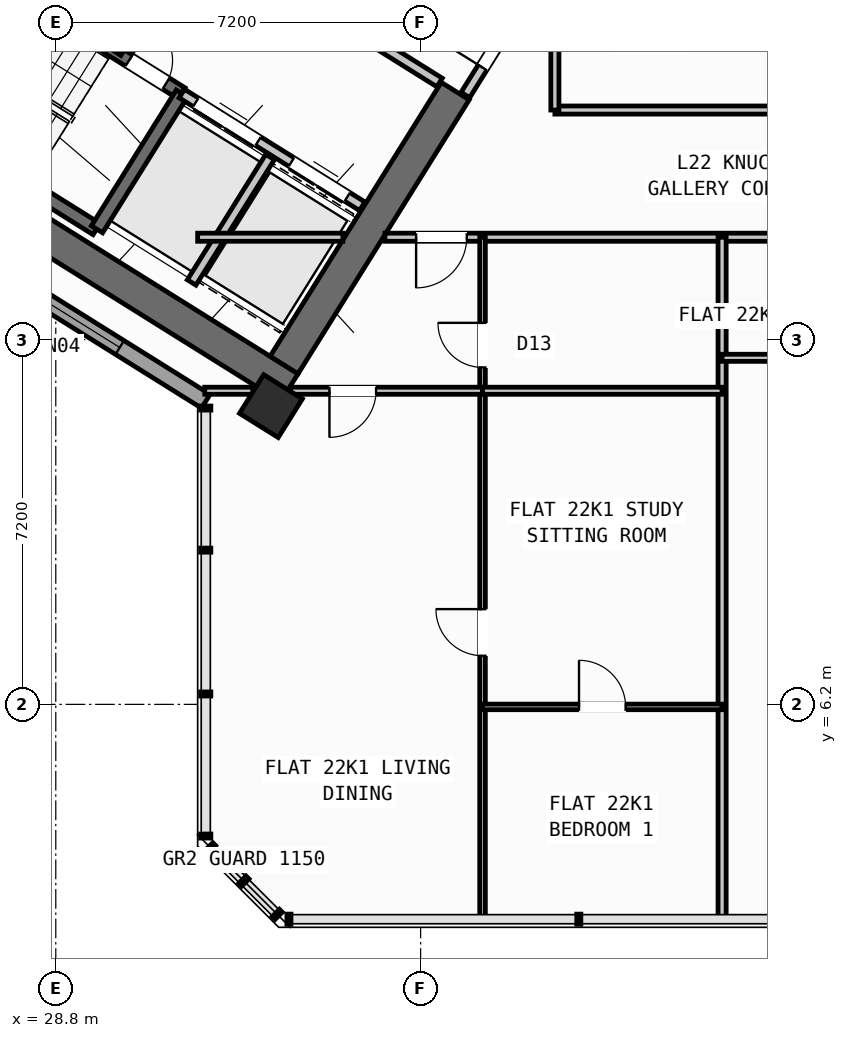
"""IFC4 building model, lengths in metres.
Left out: names, types, materials, properties, quantities, classifications, styles, units other than length and angle.
Written with IfcOpenShell. Run it as: python <this file> out.ifc"""

import sys

from ifc_helpers import new_model, si_unit, direction, frame, frame_2d, origin, origin_2d, place, context, subcontext, project, spatial, rectangle, hollow_rectangle, extrude, source, transform, mapped, element, fill, save


model = new_model("IFC4")
c1 = context("Model", 3, precision=1e-05, world=origin(), true_north=direction((0.0, 1.0)))
c2 = subcontext(c1, "Body", "Model", "MODEL_VIEW")
j1 = project(units=[si_unit("LENGTHUNIT", "METRE"), si_unit("PLANEANGLEUNIT", "RADIAN")], contexts=[c1])
p1 = place(None, origin())
s1 = spatial("IfcSite", under=j1, at=p1, CompositionType="ELEMENT")
p2 = place(p1, origin())
s2 = spatial("IfcBuilding", under=s1, at=p2, CompositionType="ELEMENT")
p3 = place(p2, frame((0.0, 0.0, 90.0)))
s3 = spatial("IfcBuildingStorey", under=s2, at=p3, CompositionType="ELEMENT", Elevation=90.0)
p4 = place(p3, frame((33.409, 12.45, 0.0), z_axis=(0.0, 0.0, 1.0), x_axis=(-0.848051132073, 0.529914405721, 0.0)))
e1 = element("IfcWall", 1, at=p4, inside=s3, PredefinedType="SHEAR", context=c2, shape_type="SweptSolid", body=[
    extrude(rectangle(XDim=13.24, YDim=0.65, at=frame_2d((6.62, 0.0))), origin(), (0.0, 0.0, 1.0), 3.35),
])
p5 = place(p3, frame((36.683, 18.304, 0.0), z_axis=(0.0, 0.0, 1.0), x_axis=(-0.529899109053, -0.848060690178, 0.0)))
e2 = element("IfcWall", 2, at=p5, inside=s3, PredefinedType="SHEAR", context=c2, shape_type="SweptSolid", body=[
    extrude(rectangle(XDim=6.375, YDim=0.65, at=frame_2d((3.188, 0.0))), origin(), (0.0, 0.0, 1.0), 3.35),
])
m1 = source(origin(), c2, "Body", "SweptSolid", [
    extrude(hollow_rectangle(XDim=0.9, YDim=0.9, WallThickness=0.036, at=origin_2d()), origin(), (0.0, 0.0, 1.0), 3.6),
])
p6 = place(p3, frame((33.046, 12.087, 0.0), z_axis=(0.0, 0.0, 1.0), x_axis=(-0.848048096156, 0.529919264233, 0.0)))
e3 = element("IfcColumn", 3, at=p6, inside=s3, PredefinedType="COLUMN", context=c2, shape_type="MappedRepresentation", body=[
    mapped(m1, transform((0.0, 0.0, 0.0), scale=1.0)),
])
p7 = place(p3, frame((31.76, 12.183, 0.0), z_axis=(0.0, 0.0, 1.0), x_axis=(-0.848047074256, 0.529920899612, 0.0)))
e4 = element("IfcWall", 4, at=p7, inside=s3, PredefinedType="STANDARD", context=c2, shape_type="SweptSolid", body=[
    extrude(rectangle(XDim=30.652, YDim=0.32, at=frame_2d((15.326, 0.0))), origin(), (0.0, 0.0, 1.0), 3.35),
])
p8 = place(p7, frame((15.153, 0.0, 0.0)))
e5 = element("IfcOpeningElement", 5, at=p8, cuts=e4, PredefinedType="OPENING", context=c2, shape_type="SweptSolid", body=[
    extrude(rectangle(XDim=1.2, YDim=2.15, at=frame_2d((0.6, 1.075))), frame((0.0, 0.17, 0.0), z_axis=(0.0, -1.0, 0.0), x_axis=(1.0, 0.0, 0.0)), (0.0, 0.0, 1.0), 0.34),
])
p9 = place(p7, frame((2.002, 0.0, 0.8)))
e6 = element("IfcOpeningElement", 6, at=p9, cuts=e4, PredefinedType="OPENING", context=c2, shape_type="SweptSolid", body=[
    extrude(rectangle(XDim=2.1, YDim=1.55, at=frame_2d((1.05, 0.775))), frame((0.0, 0.17, 0.0), z_axis=(0.0, -1.0, 0.0), x_axis=(1.0, 0.0, 0.0)), (0.0, 0.0, 1.0), 0.34),
])
p10 = place(p7, frame((7.206, 0.0, 0.8)))
e7 = element("IfcOpeningElement", 7, at=p10, cuts=e4, PredefinedType="OPENING", context=c2, shape_type="SweptSolid", body=[
    extrude(rectangle(XDim=2.1, YDim=1.55, at=frame_2d((1.05, 0.775))), frame((0.0, 0.17, 0.0), z_axis=(0.0, -1.0, 0.0), x_axis=(1.0, 0.0, 0.0)), (0.0, 0.0, 1.0), 0.34),
])
p11 = place(p7, frame((12.648, 0.0, 1.0)))
e8 = element("IfcOpeningElement", 8, at=p11, cuts=e4, PredefinedType="OPENING", context=c2, shape_type="SweptSolid", body=[
    extrude(rectangle(XDim=0.9, YDim=1.25, at=frame_2d((0.45, 0.625))), frame((0.0, 0.17, 0.0), z_axis=(0.0, -1.0, 0.0), x_axis=(1.0, 0.0, 0.0)), (0.0, 0.0, 1.0), 0.34),
])
p12 = place(p7, frame((27.974, 0.0, 0.95)))
e9 = element("IfcOpeningElement", 9, at=p12, cuts=e4, PredefinedType="OPENING", context=c2, shape_type="SweptSolid", body=[
    extrude(rectangle(XDim=1.2, YDim=1.4, at=frame_2d((0.6, 0.7))), frame((0.0, 0.17, 0.0), z_axis=(0.0, -1.0, 0.0), x_axis=(1.0, 0.0, 0.0)), (0.0, 0.0, 1.0), 0.34),
])
p13 = place(p7, frame((18.347, 0.0, 1.0)))
e10 = element("IfcOpeningElement", 10, at=p13, cuts=e4, PredefinedType="OPENING", context=c2, shape_type="SweptSolid", body=[
    extrude(rectangle(XDim=0.9, YDim=1.25, at=frame_2d((0.45, 0.625))), frame((0.0, 0.17, 0.0), z_axis=(0.0, -1.0, 0.0), x_axis=(1.0, 0.0, 0.0)), (0.0, 0.0, 1.0), 0.34),
])
p14 = place(p7, frame((20.931, 0.0, 1.0)))
e11 = element("IfcOpeningElement", 11, at=p14, cuts=e4, PredefinedType="OPENING", context=c2, shape_type="SweptSolid", body=[
    extrude(rectangle(XDim=0.65, YDim=1.15, at=frame_2d((0.325, 0.575))), frame((0.0, 0.17, 0.0), z_axis=(0.0, -1.0, 0.0), x_axis=(1.0, 0.0, 0.0)), (0.0, 0.0, 1.0), 0.34),
])
p15 = place(p7, frame((22.938, 0.0, 1.0)))
e12 = element("IfcOpeningElement", 12, at=p15, cuts=e4, PredefinedType="OPENING", context=c2, shape_type="SweptSolid", body=[
    extrude(rectangle(XDim=0.9, YDim=1.25, at=frame_2d((0.45, 0.625))), frame((0.0, 0.17, 0.0), z_axis=(0.0, -1.0, 0.0), x_axis=(1.0, 0.0, 0.0)), (0.0, 0.0, 1.0), 0.34),
])
p16 = place(p7, frame((25.069, 0.0, 1.0)))
e13 = element("IfcOpeningElement", 13, at=p16, cuts=e4, PredefinedType="OPENING", context=c2, shape_type="SweptSolid", body=[
    extrude(rectangle(XDim=0.9, YDim=1.25, at=frame_2d((0.45, 0.625))), frame((0.0, 0.17, 0.0), z_axis=(0.0, -1.0, 0.0), x_axis=(1.0, 0.0, 0.0)), (0.0, 0.0, 1.0), 0.34),
])
p17 = place(p3, frame((29.605, 15.581, 0.0), z_axis=(0.0, 0.0, 1.0), x_axis=(-0.848036911448, 0.529937163087, 0.0)))
e14 = element("IfcWall", 14, at=p17, inside=s3, PredefinedType="SHEAR", context=c2, shape_type="SweptSolid", body=[
    extrude(rectangle(XDim=7.46, YDim=0.26, at=frame_2d((3.73, 0.0))), origin(), (0.0, 0.0, 1.0), 3.35),
])
p18 = place(p3, frame((31.28, 18.261, 0.0), z_axis=(0.0, 0.0, 1.0), x_axis=(-0.848051618787, 0.529913626805, 0.0)))
e15 = element("IfcWall", 15, at=p18, inside=s3, PredefinedType="SHEAR", context=c2, shape_type="SweptSolid", body=[
    extrude(rectangle(XDim=7.46, YDim=0.26, at=frame_2d((3.73, 0.0))), origin(), (0.0, 0.0, 1.0), 3.35),
])
p19 = place(p18, frame((0.36, 0.0, 0.0)))
e16 = element("IfcOpeningElement", 16, at=p19, cuts=e15, PredefinedType="OPENING", context=c2, shape_type="SweptSolid", body=[
    extrude(rectangle(XDim=0.86, YDim=2.05, at=frame_2d((0.43, 1.025))), frame((0.0, 0.14, 0.0), z_axis=(0.0, -1.0, 0.0), x_axis=(1.0, 0.0, 0.0)), (0.0, 0.0, 1.0), 0.28),
])
p20 = place(p3, frame((31.288, 18.256, 0.0), z_axis=(0.0, 0.0, 1.0), x_axis=(-0.529943379326, -0.848033026897, 0.0)))
e17 = element("IfcWall", 17, at=p20, inside=s3, PredefinedType="SHEAR", context=c2, shape_type="SweptSolid", body=[
    extrude(rectangle(XDim=3.16, YDim=0.26, at=frame_2d((1.58, 0.0))), origin(), (0.0, 0.0, 1.0), 3.35),
])
p21 = place(p3, frame((34.848, 16.031, 0.0), z_axis=(0.0, 0.0, 1.0), x_axis=(-0.848044042236, 0.529925751807, 0.0)))
e18 = element("IfcWall", 18, at=p21, inside=s3, PredefinedType="STANDARD", context=c2, shape_type="SweptSolid", body=[
    extrude(rectangle(XDim=4.198, YDim=0.2, at=frame_2d((2.099, 0.0))), origin(), (0.0, 0.0, 1.0), 3.34),
])
p22 = place(p21, frame((0.348, 0.0, 0.0)))
e19 = element("IfcOpeningElement", 19, at=p22, cuts=e18, PredefinedType="OPENING", context=c2, shape_type="SweptSolid", body=[
    extrude(rectangle(XDim=1.3, YDim=2.2, at=frame_2d((0.65, 1.1))), frame((0.0, 0.11, 0.0), z_axis=(0.0, -1.0, 0.0), x_axis=(1.0, 0.0, 0.0)), (0.0, 0.0, 1.0), 0.22),
])
p23 = place(p21, frame((2.423, 0.0, 0.0)))
e20 = element("IfcOpeningElement", 20, at=p23, cuts=e18, PredefinedType="OPENING", context=c2, shape_type="SweptSolid", body=[
    extrude(rectangle(XDim=1.45, YDim=2.25, at=frame_2d((0.725, 1.125))), frame((0.0, 0.11, 0.0), z_axis=(0.0, -1.0, 0.0), x_axis=(1.0, 0.0, 0.0)), (0.0, 0.0, 1.0), 0.22),
])
p24 = place(p3, frame((36.374, 18.474, 0.0), z_axis=(0.0, 0.0, 1.0), x_axis=(-0.848051071577, 0.529914502535, 0.0)))
e21 = element("IfcWall", 21, at=p24, inside=s3, PredefinedType="STANDARD", context=c2, shape_type="SweptSolid", body=[
    extrude(rectangle(XDim=5.718, YDim=0.2, at=frame_2d((2.859, 0.0))), origin(), (0.0, 0.0, 1.0), 3.34),
])
p25 = place(p24, frame((2.498, 0.0, 0.0)))
e22 = element("IfcOpeningElement", 22, at=p25, cuts=e21, PredefinedType="OPENING", context=c2, shape_type="SweptSolid", body=[
    extrude(rectangle(XDim=1.15, YDim=2.1, at=frame_2d((0.575, 1.05))), frame((0.0, 0.11, 0.0), z_axis=(0.0, -1.0, 0.0), x_axis=(1.0, 0.0, 0.0)), (0.0, 0.0, 1.0), 0.22),
])
p26 = place(p3, frame((33.029, 17.003, 0.0), z_axis=(0.0, 0.0, 1.0), x_axis=(-0.529916267533, -0.848049968695, 0.0)))
e23 = element("IfcWall", 23, at=p26, inside=s3, PredefinedType="STANDARD", context=c2, shape_type="SweptSolid", body=[
    extrude(rectangle(XDim=2.92, YDim=0.2, at=frame_2d((1.46, 0.0))), origin(), (0.0, 0.0, 1.0), 3.34),
])
p27 = place(p3, frame((31.525, 21.504, 0.0), z_axis=(0.0, 0.0, 1.0), x_axis=(-0.529907497854, -0.848055448493, 0.0)))
e24 = element("IfcWall", 24, at=p27, inside=s3, PredefinedType="STANDARD", context=c2, shape_type="SweptSolid", body=[
    extrude(rectangle(XDim=2.88, YDim=0.2, at=frame_2d((1.44, 0.0))), origin(), (0.0, 0.0, 1.0), 3.34),
])
p28 = place(p3, frame((38.451, 20.737, 0.0), z_axis=(0.0, 0.0, 1.0), x_axis=(-0.529924799939, -0.848044637038, 0.0)))
e25 = element("IfcWall", 25, at=p28, inside=s3, PredefinedType="STANDARD", context=c2, shape_type="SweptSolid", body=[
    extrude(rectangle(XDim=2.96, YDim=0.2, at=frame_2d((1.48, 0.0))), origin(), (0.0, 0.0, 1.0), 3.34),
])
p29 = place(p28, frame((1.46, 0.0, 0.0)))
e26 = element("IfcOpeningElement", 26, at=p29, cuts=e25, PredefinedType="OPENING", context=c2, shape_type="SweptSolid", body=[
    extrude(rectangle(XDim=0.86, YDim=2.05, at=frame_2d((0.43, 1.025))), frame((0.0, 0.11, 0.0), z_axis=(0.0, -1.0, 0.0), x_axis=(1.0, 0.0, 0.0)), (0.0, 0.0, 1.0), 0.22),
])
p30 = place(p3, frame((31.6, 15.42, 0.0), z_axis=(0.0, 0.0, 1.0), x_axis=(1.0, 0.0, 0.0)))
e27 = element("IfcWall", 27, at=p30, inside=s3, PredefinedType="PARTITIONING", context=c2, shape_type="SweptSolid", body=[
    extrude(rectangle(XDim=2.866, YDim=0.16, at=frame_2d((1.433, 0.0))), origin(), (0.0, 0.0, 1.0), 3.34),
])
p31 = place(p3, frame((35.296, 15.42, 0.0), z_axis=(0.0, 0.0, 1.0), x_axis=(1.0, 0.0, 0.0)))
e28 = element("IfcWall", 28, at=p31, inside=s3, PredefinedType="PARTITIONING", context=c2, shape_type="SweptSolid", body=[
    extrude(rectangle(XDim=15.311, YDim=0.16, at=frame_2d((7.655, 0.0))), origin(), (0.0, 0.0, 1.0), 3.34),
])
p32 = place(p31, frame((0.615, 0.0, 0.0)))
e29 = element("IfcOpeningElement", 29, at=p32, cuts=e28, PredefinedType="OPENING", context=c2, shape_type="SweptSolid", body=[
    extrude(rectangle(XDim=1.0, YDim=2.1, at=frame_2d((0.5, 1.05))), frame((0.0, 0.09, 0.0), z_axis=(0.0, -1.0, 0.0), x_axis=(1.0, 0.0, 0.0)), (0.0, 0.0, 1.0), 0.18),
])
p33 = place(p31, frame((9.035, 0.0, 0.0)))
e30 = element("IfcOpeningElement", 30, at=p33, cuts=e28, PredefinedType="OPENING", context=c2, shape_type="SweptSolid", body=[
    extrude(rectangle(XDim=1.0, YDim=2.1, at=frame_2d((0.5, 1.05))), frame((0.0, 0.09, 0.0), z_axis=(0.0, -1.0, 0.0), x_axis=(1.0, 0.0, 0.0)), (0.0, 0.0, 1.0), 0.18),
])
p34 = place(p3, frame((38.65, 17.93, 0.0), z_axis=(0.0, 0.0, 1.0), x_axis=(1.0, 0.0, 0.0)))
e31 = element("IfcWall", 31, at=p34, inside=s3, PredefinedType="PARTITIONING", context=c2, shape_type="SweptSolid", body=[
    extrude(rectangle(XDim=9.95, YDim=0.16, at=frame_2d((4.975, 0.0))), origin(), (0.0, 0.0, 1.0), 3.34),
])
p35 = place(p34, frame((4.475, 0.0, 0.0)))
e32 = element("IfcOpeningElement", 32, at=p35, cuts=e31, PredefinedType="OPENING", context=c2, shape_type="SweptSolid", body=[
    extrude(rectangle(XDim=1.0, YDim=2.1, at=frame_2d((0.5, 1.05))), frame((0.0, 0.09, 0.0), z_axis=(0.0, -1.0, 0.0), x_axis=(1.0, 0.0, 0.0)), (0.0, 0.0, 1.0), 0.18),
])
p36 = place(p3, frame((38.65, 17.93, 0.0), z_axis=(0.0, 0.0, 1.0), x_axis=(0.0, 1.0, 0.0)))
e33 = element("IfcWall", 33, at=p36, inside=s3, PredefinedType="PARTITIONING", context=c2, shape_type="SweptSolid", body=[
    extrude(rectangle(XDim=2.857, YDim=0.16, at=frame_2d((1.428, 0.0))), origin(), (0.0, 0.0, 1.0), 3.34),
])
p37 = place(p3, frame((41.95, 1.96, 0.0), z_axis=(0.0, 0.0, 1.0), x_axis=(0.0, 1.0, 0.0)))
e34 = element("IfcWall", 34, at=p37, inside=s3, PredefinedType="PARTITIONING", context=c2, shape_type="SweptSolid", body=[
    extrude(rectangle(XDim=13.46, YDim=0.16, at=frame_2d((6.73, 0.0))), origin(), (0.0, 0.0, 1.0), 3.34),
])
p38 = place(p3, frame((37.222, 1.96, 0.0), z_axis=(0.0, 0.0, 1.0), x_axis=(0.0, 1.0, 0.0)))
e35 = element("IfcWall", 35, at=p38, inside=s3, PredefinedType="PARTITIONING", context=c2, shape_type="SweptSolid", body=[
    extrude(rectangle(XDim=13.46, YDim=0.11, at=frame_2d((6.73, 0.0))), origin(), (0.0, 0.0, 1.0), 3.34),
])
p39 = place(p38, frame((5.2, 0.0, 0.0)))
e36 = element("IfcOpeningElement", 36, at=p39, cuts=e35, PredefinedType="OPENING", context=c2, shape_type="SweptSolid", body=[
    extrude(rectangle(XDim=0.92, YDim=2.08, at=frame_2d((0.46, 1.04))), frame((0.0, 0.065, 0.0), z_axis=(0.0, -1.0, 0.0), x_axis=(1.0, 0.0, 0.0)), (0.0, 0.0, 1.0), 0.13),
])
p40 = place(p38, frame((10.89, 0.0, 0.0)))
e37 = element("IfcOpeningElement", 37, at=p40, cuts=e35, PredefinedType="OPENING", context=c2, shape_type="SweptSolid", body=[
    extrude(rectangle(XDim=0.88, YDim=2.08, at=frame_2d((0.44, 1.04))), frame((0.0, 0.065, 0.0), z_axis=(0.0, -1.0, 0.0), x_axis=(1.0, 0.0, 0.0)), (0.0, 0.0, 1.0), 0.13),
])
p41 = place(p3, frame((31.74, 12.39, 0.0), z_axis=(0.0, 0.0, 1.0), x_axis=(1.0, 0.0, 0.0)))
e38 = element("IfcWall", 38, at=p41, inside=s3, PredefinedType="PLUMBINGWALL", context=c2, shape_type="SweptSolid", body=[
    extrude(rectangle(XDim=0.951, YDim=0.14, at=frame_2d((0.475, 0.0))), origin(), (0.0, 0.0, 1.0), 3.34),
])
p42 = place(p3, frame((33.433, 12.39, 0.0), z_axis=(0.0, 0.0, 1.0), x_axis=(1.0, 0.0, 0.0)))
e39 = element("IfcWall", 39, at=p42, inside=s3, PredefinedType="PLUMBINGWALL", context=c2, shape_type="SweptSolid", body=[
    extrude(rectangle(XDim=3.789, YDim=0.14, at=frame_2d((1.895, 0.0))), origin(), (0.0, 0.0, 1.0), 2.525),
])
p43 = place(p42, frame((0.768, 0.0, 0.0)))
e40 = element("IfcOpeningElement", 40, at=p43, cuts=e39, PredefinedType="OPENING", context=c2, shape_type="SweptSolid", body=[
    extrude(rectangle(XDim=0.92, YDim=2.08, at=frame_2d((0.46, 1.04))), frame((0.0, 0.08, 0.0), z_axis=(0.0, -1.0, 0.0), x_axis=(1.0, 0.0, 0.0)), (0.0, 0.0, 1.0), 0.16),
])
p44 = place(p3, frame((37.222, 12.39, 0.0), z_axis=(0.0, 0.0, 1.0), x_axis=(1.0, 0.0, 0.0)))
e41 = element("IfcWall", 41, at=p44, inside=s3, PredefinedType="PLUMBINGWALL", context=c2, shape_type="SweptSolid", body=[
    extrude(rectangle(XDim=4.728, YDim=0.14, at=frame_2d((2.364, 0.0))), origin(), (0.0, 0.0, 1.0), 2.525),
])
p45 = place(p3, frame((37.222, 6.15, 0.0), z_axis=(0.0, 0.0, 1.0), x_axis=(1.0, 0.0, 0.0)))
e42 = element("IfcWall", 42, at=p45, inside=s3, PredefinedType="PARTITIONING", context=c2, shape_type="SweptSolid", body=[
    extrude(rectangle(XDim=4.728, YDim=0.11, at=frame_2d((2.364, 0.0))), origin(), (0.0, 0.0, 1.0), 3.34),
])
p46 = place(p45, frame((1.904, 0.0, 0.0)))
e43 = element("IfcOpeningElement", 43, at=p46, cuts=e42, PredefinedType="OPENING", context=c2, shape_type="SweptSolid", body=[
    extrude(rectangle(XDim=0.92, YDim=2.08, at=frame_2d((0.46, 1.04))), frame((0.0, 0.065, 0.0), z_axis=(0.0, -1.0, 0.0), x_axis=(1.0, 0.0, 0.0)), (0.0, 0.0, 1.0), 0.13),
])
p47 = place(p3, frame((41.95, 13.04, 0.0), z_axis=(0.0, 0.0, 1.0), x_axis=(1.0, 0.0, 0.0)))
e44 = element("IfcWall", 44, at=p47, inside=s3, PredefinedType="PLUMBINGWALL", context=c2, shape_type="SweptSolid", body=[
    extrude(rectangle(XDim=5.713, YDim=0.14, at=frame_2d((2.856, 0.0))), origin(), (0.0, 0.0, 1.0), 3.34),
])
p48 = place(p47, frame((2.396, 0.0, 0.0)))
e45 = element("IfcOpeningElement", 45, at=p48, cuts=e44, PredefinedType="OPENING", context=c2, shape_type="SweptSolid", body=[
    extrude(rectangle(XDim=0.92, YDim=2.08, at=frame_2d((0.46, 1.04))), frame((0.0, 0.08, 0.0), z_axis=(0.0, -1.0, 0.0), x_axis=(1.0, 0.0, 0.0)), (0.0, 0.0, 1.0), 0.16),
])
m2 = source(origin(), c2, "Body", "SweptSolid", [
    extrude(rectangle(XDim=2.1, YDim=1.55, at=frame_2d((1.05, 0.775))), frame((0.0, 0.03, 0.0), z_axis=(0.0, -1.0, 0.0), x_axis=(1.0, 0.0, 0.0)), (0.0, 0.0, 1.0), 0.06),
])
p49 = place(p9, origin())
e46 = element("IfcWindow", 46, at=p49, inside=s3, PartitioningType="SINGLE_PANEL", PredefinedType="WINDOW", context=c2, shape_type="MappedRepresentation", body=[
    mapped(m2, transform((0.0, 0.0, 0.0), scale=1.0)),
])
fill(e6, e46)
m3 = source(origin(), c2, "Body", "SweptSolid", [
    extrude(rectangle(XDim=0.86, YDim=2.05, at=frame_2d((0.43, 1.025))), frame((0.0, 0.025, 0.0), z_axis=(0.0, -1.0, 0.0), x_axis=(1.0, 0.0, 0.0)), (0.0, 0.0, 1.0), 0.05),
])
p50 = place(p19, frame((0.86, 0.0, 0.0), z_axis=(0.0, 0.0, 1.0), x_axis=(-1.0, 0.0, 0.0)))
e47 = element("IfcDoor", 47, at=p50, inside=s3, OperationType="SINGLE_SWING_LEFT", PredefinedType="DOOR", context=c2, shape_type="MappedRepresentation", body=[
    mapped(m3, transform((0.0, 0.0, 0.0), scale=1.0)),
])
fill(e16, e47)
m4 = source(origin(), c2, "Body", "SweptSolid", [
    extrude(rectangle(XDim=1.3, YDim=2.2, at=frame_2d((0.65, 1.1))), frame((0.0, 0.025, 0.0), z_axis=(0.0, -1.0, 0.0), x_axis=(1.0, 0.0, 0.0)), (0.0, 0.0, 1.0), 0.05),
])
p51 = place(p22, origin())
e48 = element("IfcDoor", 48, at=p51, inside=s3, OperationType="DOUBLE_DOOR_SLIDING", PredefinedType="DOOR", context=c2, shape_type="MappedRepresentation", body=[
    mapped(m4, transform((0.0, 0.0, 0.0), scale=1.0)),
])
fill(e19, e48)
m5 = source(origin(), c2, "Body", "SweptSolid", [
    extrude(rectangle(XDim=1.45, YDim=2.25, at=frame_2d((0.725, 1.125))), frame((0.0, 0.025, 0.0), z_axis=(0.0, -1.0, 0.0), x_axis=(1.0, 0.0, 0.0)), (0.0, 0.0, 1.0), 0.05),
])
p52 = place(p23, origin())
e49 = element("IfcDoor", 49, at=p52, inside=s3, OperationType="DOUBLE_DOOR_SLIDING", PredefinedType="DOOR", context=c2, shape_type="MappedRepresentation", body=[
    mapped(m5, transform((0.0, 0.0, 0.0), scale=1.0)),
])
fill(e20, e49)
p53 = place(p29, frame((0.86, 0.0, 0.0), z_axis=(0.0, 0.0, 1.0), x_axis=(-1.0, 0.0, 0.0)))
e50 = element("IfcDoor", 50, at=p53, inside=s3, OperationType="SINGLE_SWING_LEFT", PredefinedType="DOOR", context=c2, shape_type="MappedRepresentation", body=[
    mapped(m3, transform((0.0, 0.0, 0.0), scale=1.0)),
])
fill(e26, e50)
m6 = source(origin(), c2, "Body", "SweptSolid", [
    extrude(rectangle(XDim=0.92, YDim=2.08, at=frame_2d((0.46, 1.04))), frame((0.0, 0.025, 0.0), z_axis=(0.0, -1.0, 0.0), x_axis=(1.0, 0.0, 0.0)), (0.0, 0.0, 1.0), 0.05),
])
p54 = place(p39, origin())
e51 = element("IfcDoor", 51, at=p54, inside=s3, OperationType="SINGLE_SWING_RIGHT", PredefinedType="DOOR", context=c2, shape_type="MappedRepresentation", body=[
    mapped(m6, transform((0.0, 0.0, 0.0), scale=1.0)),
])
fill(e36, e51)
p55 = place(p46, origin())
e52 = element("IfcDoor", 52, at=p55, inside=s3, OperationType="SINGLE_SWING_LEFT", PredefinedType="DOOR", context=c2, shape_type="MappedRepresentation", body=[
    mapped(m6, transform((0.0, 0.0, 0.0), scale=1.0)),
])
fill(e43, e52)
m7 = source(origin(), c2, "Body", "SweptSolid", [
    extrude(rectangle(XDim=1.0, YDim=2.1, at=frame_2d((0.5, 1.05))), frame((0.0, 0.025, 0.0), z_axis=(0.0, -1.0, 0.0), x_axis=(1.0, 0.0, 0.0)), (0.0, 0.0, 1.0), 0.05),
])
p56 = place(p32, frame((1.0, 0.0, 0.0), z_axis=(0.0, 0.0, 1.0), x_axis=(-1.0, 0.0, 0.0)))
e53 = element("IfcDoor", 53, at=p56, inside=s3, OperationType="SINGLE_SWING_RIGHT", PredefinedType="DOOR", context=c2, shape_type="MappedRepresentation", body=[
    mapped(m7, transform((0.0, 0.0, 0.0), scale=1.0)),
])
fill(e29, e53)
p57 = place(p43, frame((0.92, 0.0, 0.0), z_axis=(0.0, 0.0, 1.0), x_axis=(-1.0, 0.0, 0.0)))
e54 = element("IfcDoor", 54, at=p57, inside=s3, OperationType="SINGLE_SWING_RIGHT", PredefinedType="DOOR", context=c2, shape_type="MappedRepresentation", body=[
    mapped(m6, transform((0.0, 0.0, 0.0), scale=1.0)),
])
fill(e40, e54)
m8 = source(origin(), c2, "Body", "SweptSolid", [
    extrude(rectangle(XDim=0.88, YDim=2.08, at=frame_2d((0.44, 1.04))), frame((0.0, 0.025, 0.0), z_axis=(0.0, -1.0, 0.0), x_axis=(1.0, 0.0, 0.0)), (0.0, 0.0, 1.0), 0.05),
])
p58 = place(p40, origin())
e55 = element("IfcDoor", 55, at=p58, inside=s3, OperationType="SINGLE_SWING_RIGHT", PredefinedType="DOOR", context=c2, shape_type="MappedRepresentation", body=[
    mapped(m8, transform((0.0, 0.0, 0.0), scale=1.0)),
])
fill(e37, e55)
save(model, sys.argv[1])
